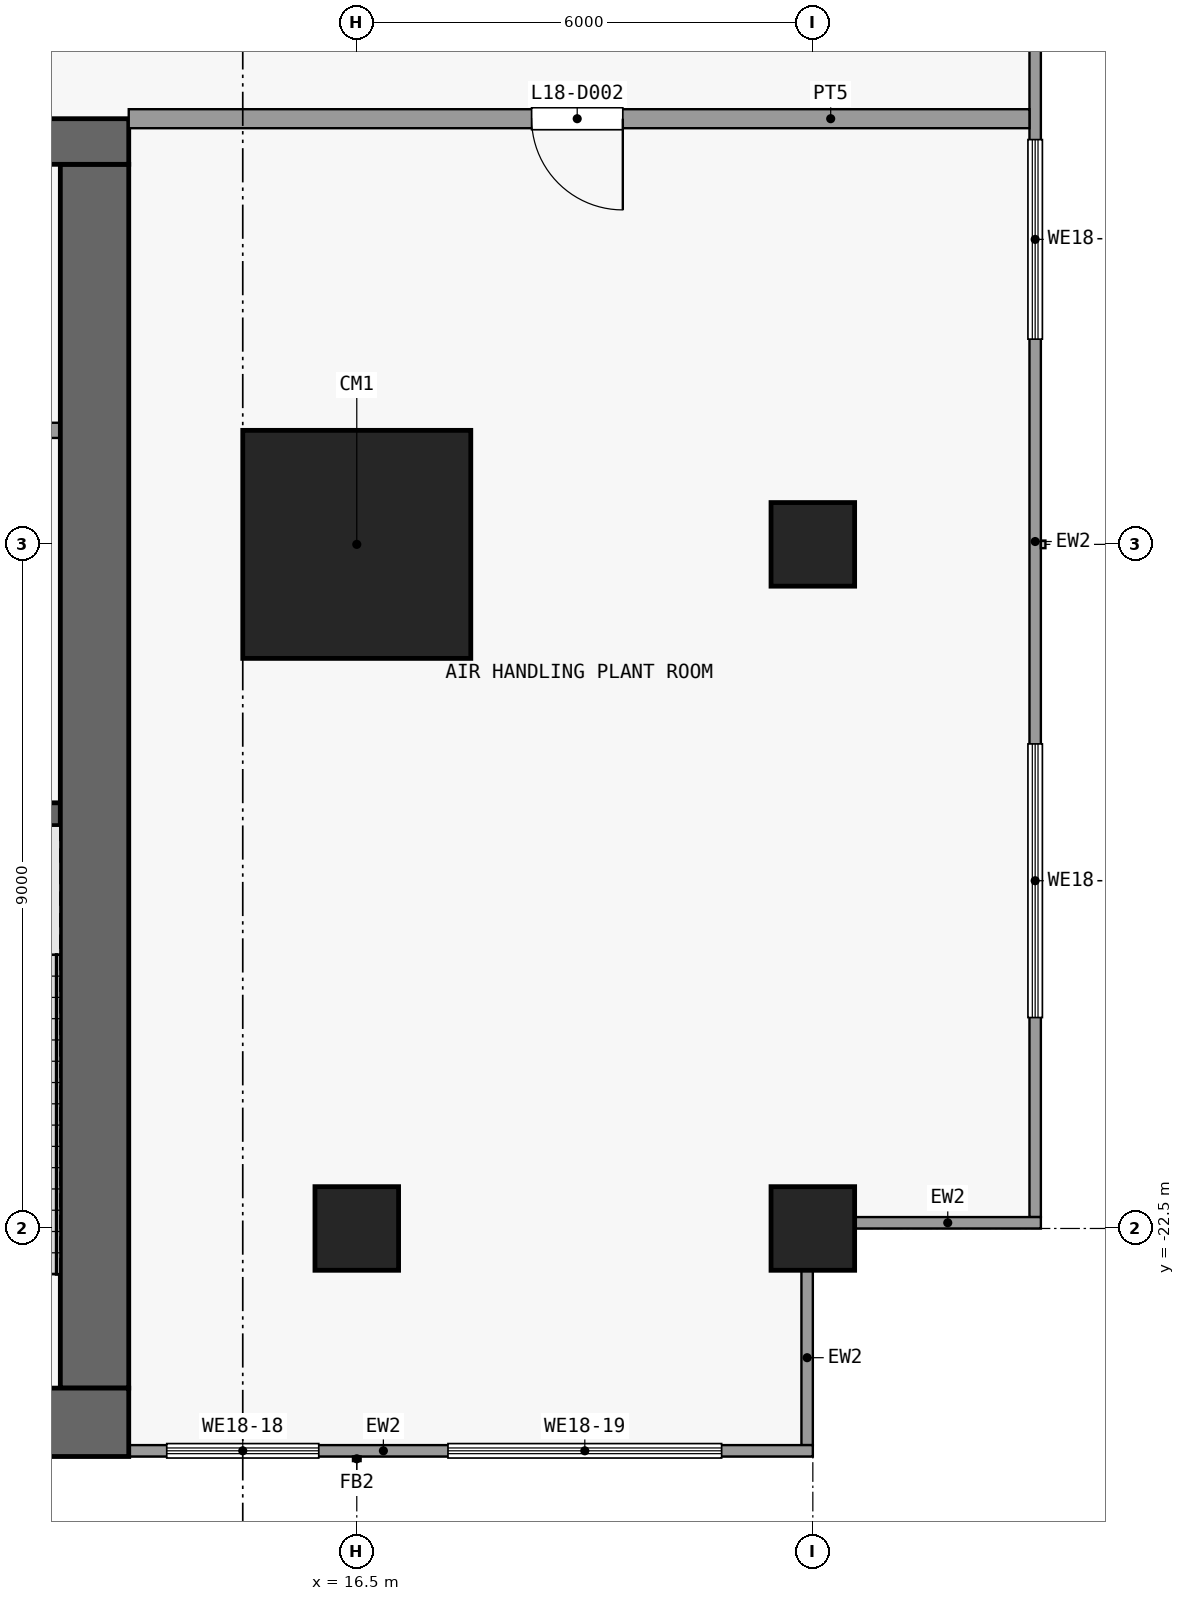
"""IFC4 building model, lengths in metres.
Left out: names, types, materials, properties, quantities, classifications, styles, units other than length and angle.
Written with IfcOpenShell. Run it as: python <this file> out.ifc"""

import sys

from ifc_helpers import new_model, si_unit, direction, frame, frame_2d, origin, origin_2d, place, context, subcontext, project, spatial, rectangle, extrude, element, fill, save


model = new_model("IFC4")
c1 = context("Model", 3, precision=1e-05, world=origin(), true_north=direction((0.0, 1.0)))
c2 = subcontext(c1, "Body", "Model", "MODEL_VIEW")
j1 = project(units=[si_unit("LENGTHUNIT", "METRE"), si_unit("PLANEANGLEUNIT", "RADIAN")], contexts=[c1])
p1 = place(None, origin())
s1 = spatial("IfcSite", under=j1, at=p1, CompositionType="ELEMENT")
p2 = place(p1, origin())
s2 = spatial("IfcBuilding", under=s1, at=p2, CompositionType="ELEMENT")
p3 = place(p2, frame((0.0, 0.0, 75.7)))
s3 = spatial("IfcBuildingStorey", under=s2, at=p3, CompositionType="ELEMENT", Elevation=75.7)
p4 = place(p3, frame((16.5, -22.5, 0.0), z_axis=(0.0, 0.0, 1.0), x_axis=(1.0, 0.0, 0.0)))
e1 = element("IfcColumn", 1, at=p4, inside=s3, PredefinedType="COLUMN", context=c2, shape_type="SweptSolid", body=[
    extrude(rectangle(XDim=1.1, YDim=1.1, at=origin_2d()), origin(), (0.0, 0.0, 1.0), 5.4),
])
p5 = place(p3, frame((16.5, -13.5, 0.0), z_axis=(0.0, 0.0, 1.0), x_axis=(1.0, 0.0, 0.0)))
e2 = element("IfcColumn", 2, at=p5, inside=s3, PredefinedType="COLUMN", context=c2, shape_type="SweptSolid", body=[
    extrude(rectangle(XDim=3.0, YDim=3.0, at=origin_2d()), origin(), (0.0, 0.0, 1.0), 5.4),
])
for number, where, z_axis, x_axis in (
    (3, (22.5, -22.5, 0.0), (0.0, 0.0, 1.0), (1.0, 0.0, 0.0)),
    (4, (22.5, -13.5, 0.0), (0.0, 0.0, 1.0), (1.0, 0.0, 0.0)),
):
    element("IfcColumn", number, at=place(p3, frame(where, z_axis=z_axis, x_axis=x_axis)), inside=s3, PredefinedType="COLUMN", context=c2, shape_type="SweptSolid", body=[
        extrude(rectangle(XDim=1.1, YDim=1.1, at=origin_2d()), origin(), (0.0, 0.0, 1.0), 5.4),
    ])
p6 = place(p3, frame((-13.5, -25.05, 0.0), z_axis=(0.0, 0.0, 1.0), x_axis=(1.0, 0.0, 0.0)))
e5 = element("IfcWall", 5, at=p6, inside=s3, PredefinedType="SHEAR", context=c2, shape_type="SweptSolid", body=[
    extrude(rectangle(XDim=27.0, YDim=0.9, at=frame_2d((13.5, 0.0))), origin(), (0.0, 0.0, 1.0), 5.0),
])
p7 = place(p3, frame((-13.5, -8.2, 0.0), z_axis=(0.0, 0.0, 1.0), x_axis=(1.0, 0.0, 0.0)))
e6 = element("IfcWall", 6, at=p7, inside=s3, PredefinedType="SHEAR", context=c2, shape_type="SweptSolid", body=[
    extrude(rectangle(XDim=27.0, YDim=0.6, at=frame_2d((13.5, 0.0))), origin(), (0.0, 0.0, 1.0), 5.0),
])
p8 = place(p7, frame((7.8, 0.0, 0.0)))
e7 = element("IfcOpeningElement", 7, at=p8, cuts=e6, PredefinedType="OPENING", context=c2, shape_type="SweptSolid", body=[
    extrude(rectangle(XDim=1.8, YDim=2.1, at=frame_2d((0.9, 1.05))), frame((0.0, 0.31, 0.0), z_axis=(0.0, -1.0, 0.0), x_axis=(1.0, 0.0, 0.0)), (0.0, 0.0, 1.0), 0.62),
])
p9 = place(p7, frame((17.4, 0.0, 0.0)))
e8 = element("IfcOpeningElement", 8, at=p9, cuts=e6, PredefinedType="OPENING", context=c2, shape_type="SweptSolid", body=[
    extrude(rectangle(XDim=1.8, YDim=2.1, at=frame_2d((0.9, 1.05))), frame((0.0, 0.31, 0.0), z_axis=(0.0, -1.0, 0.0), x_axis=(1.0, 0.0, 0.0)), (0.0, 0.0, 1.0), 0.62),
])
p10 = place(p7, frame((2.725, 0.0, 0.0)))
e9 = element("IfcOpeningElement", 9, at=p10, cuts=e6, PredefinedType="OPENING", context=c2, shape_type="SweptSolid", body=[
    extrude(rectangle(XDim=0.9, YDim=2.1, at=frame_2d((0.45, 1.05))), frame((0.0, 0.31, 0.0), z_axis=(0.0, -1.0, 0.0), x_axis=(1.0, 0.0, 0.0)), (0.0, 0.0, 1.0), 0.62),
])
p11 = place(p7, frame((23.375, 0.0, 0.0)))
e10 = element("IfcOpeningElement", 10, at=p11, cuts=e6, PredefinedType="OPENING", context=c2, shape_type="SweptSolid", body=[
    extrude(rectangle(XDim=0.9, YDim=2.1, at=frame_2d((0.45, 1.05))), frame((0.0, 0.31, 0.0), z_axis=(0.0, -1.0, 0.0), x_axis=(1.0, 0.0, 0.0)), (0.0, 0.0, 1.0), 0.62),
])
p12 = place(p3, frame((13.05, -24.6, 0.0), z_axis=(0.0, 0.0, 1.0), x_axis=(0.0, 1.0, 0.0)))
e11 = element("IfcWall", 11, at=p12, inside=s3, PredefinedType="SHEAR", context=c2, shape_type="SweptSolid", body=[
    extrude(rectangle(XDim=16.1, YDim=0.9, at=frame_2d((8.05, 0.0))), origin(), (0.0, 0.0, 1.0), 5.0),
])
p13 = place(p3, frame((9.5, -17.05, 0.0), z_axis=(0.0, 0.0, 1.0), x_axis=(1.0, 0.0, 0.0)))
e12 = element("IfcWall", 12, at=p13, inside=s3, PredefinedType="SHEAR", context=c2, shape_type="SweptSolid", body=[
    extrude(rectangle(XDim=3.1, YDim=0.3, at=frame_2d((1.55, 0.0))), origin(), (0.0, 0.0, 1.0), 5.0),
])
p14 = place(p3, frame((11.15, -12.0, 0.0), z_axis=(0.0, 0.0, 1.0), x_axis=(1.0, 0.0, 0.0)))
e13 = element("IfcWall", 13, at=p14, inside=s3, PredefinedType="PARTITIONING", context=c2, shape_type="SweptSolid", body=[
    extrude(rectangle(XDim=1.45, YDim=0.2, at=frame_2d((0.725, 0.0))), origin(), (0.0, 0.0, 1.0), 5.0),
])
p15 = place(p3, frame((25.425, 25.35, 0.0), z_axis=(0.0, 0.0, 1.0), x_axis=(0.0, -1.0, 0.0)))
e14 = element("IfcWall", 14, at=p15, inside=s3, PredefinedType="SOLIDWALL", context=c2, shape_type="SweptSolid", body=[
    extrude(rectangle(XDim=47.7, YDim=0.15, at=frame_2d((23.85, 0.0))), origin(), (0.0, 0.0, 1.0), 5.0),
])
p16 = place(p15, frame((41.475, 0.0, 1.2)))
e15 = element("IfcOpeningElement", 15, at=p16, cuts=e14, PredefinedType="OPENING", context=c2, shape_type="SweptSolid", body=[
    extrude(rectangle(XDim=3.6, YDim=3.0, at=frame_2d((1.8, 1.5))), frame((0.0, 0.085, 0.0), z_axis=(0.0, -1.0, 0.0), x_axis=(1.0, 0.0, 0.0)), (0.0, 0.0, 1.0), 0.17),
])
p17 = place(p15, frame((33.525, 0.0, 1.2)))
e16 = element("IfcOpeningElement", 16, at=p17, cuts=e14, PredefinedType="OPENING", context=c2, shape_type="SweptSolid", body=[
    extrude(rectangle(XDim=2.625, YDim=3.0, at=frame_2d((1.312, 1.5))), frame((0.0, 0.085, 0.0), z_axis=(0.0, -1.0, 0.0), x_axis=(1.0, 0.0, 0.0)), (0.0, 0.0, 1.0), 0.17),
])
p18 = place(p15, frame((25.05, 0.0, 1.2)))
e17 = element("IfcOpeningElement", 17, at=p18, cuts=e14, PredefinedType="OPENING", context=c2, shape_type="SweptSolid", body=[
    extrude(rectangle(XDim=3.6, YDim=3.0, at=frame_2d((1.8, 1.5))), frame((0.0, 0.085, 0.0), z_axis=(0.0, -1.0, 0.0), x_axis=(1.0, 0.0, 0.0)), (0.0, 0.0, 1.0), 0.17),
])
p19 = place(p15, frame((19.05, 0.0, 1.2)))
e18 = element("IfcOpeningElement", 18, at=p19, cuts=e14, PredefinedType="OPENING", context=c2, shape_type="SweptSolid", body=[
    extrude(rectangle(XDim=3.6, YDim=3.0, at=frame_2d((1.8, 1.5))), frame((0.0, 0.085, 0.0), z_axis=(0.0, -1.0, 0.0), x_axis=(1.0, 0.0, 0.0)), (0.0, 0.0, 1.0), 0.17),
])
p20 = place(p15, frame((13.05, 0.0, 1.2)))
e19 = element("IfcOpeningElement", 19, at=p20, cuts=e14, PredefinedType="OPENING", context=c2, shape_type="SweptSolid", body=[
    extrude(rectangle(XDim=3.6, YDim=3.0, at=frame_2d((1.8, 1.5))), frame((0.0, 0.085, 0.0), z_axis=(0.0, -1.0, 0.0), x_axis=(1.0, 0.0, 0.0)), (0.0, 0.0, 1.0), 0.17),
])
p21 = place(p15, frame((9.125, 0.0, 1.2)))
e20 = element("IfcOpeningElement", 20, at=p21, cuts=e14, PredefinedType="OPENING", context=c2, shape_type="SweptSolid", body=[
    extrude(rectangle(XDim=1.525, YDim=3.0, at=frame_2d((0.762, 1.5))), frame((0.0, 0.085, 0.0), z_axis=(0.0, -1.0, 0.0), x_axis=(1.0, 0.0, 0.0)), (0.0, 0.0, 1.0), 0.17),
])
p22 = place(p15, frame((7.05, 0.0, 1.2)))
e21 = element("IfcOpeningElement", 21, at=p22, cuts=e14, PredefinedType="OPENING", context=c2, shape_type="SweptSolid", body=[
    extrude(rectangle(XDim=1.525, YDim=3.0, at=frame_2d((0.762, 1.5))), frame((0.0, 0.085, 0.0), z_axis=(0.0, -1.0, 0.0), x_axis=(1.0, 0.0, 0.0)), (0.0, 0.0, 1.0), 0.17),
])
p23 = place(p15, frame((1.125, 0.0, 1.2)))
e22 = element("IfcOpeningElement", 22, at=p23, cuts=e14, PredefinedType="OPENING", context=c2, shape_type="SweptSolid", body=[
    extrude(rectangle(XDim=3.6, YDim=3.0, at=frame_2d((1.8, 1.5))), frame((0.0, 0.085, 0.0), z_axis=(0.0, -1.0, 0.0), x_axis=(1.0, 0.0, 0.0)), (0.0, 0.0, 1.0), 0.17),
])
p24 = place(p3, frame((22.5, -25.425, 0.0), z_axis=(0.0, 0.0, 1.0), x_axis=(-1.0, 0.0, 0.0)))
e23 = element("IfcWall", 23, at=p24, inside=s3, PredefinedType="SOLIDWALL", context=c2, shape_type="SweptSolid", body=[
    extrude(rectangle(XDim=9.0, YDim=0.15, at=frame_2d((4.5, 0.0))), origin(), (0.0, 0.0, 1.0), 5.0),
])
p25 = place(p24, frame((6.5, 0.0, 1.2)))
e24 = element("IfcOpeningElement", 24, at=p25, cuts=e23, PredefinedType="OPENING", context=c2, shape_type="SweptSolid", body=[
    extrude(rectangle(XDim=2.0, YDim=3.0, at=frame_2d((1.0, 1.5))), frame((0.0, 0.085, 0.0), z_axis=(0.0, -1.0, 0.0), x_axis=(1.0, 0.0, 0.0)), (0.0, 0.0, 1.0), 0.17),
])
p26 = place(p24, frame((1.2, 0.0, 1.2)))
e25 = element("IfcOpeningElement", 25, at=p26, cuts=e23, PredefinedType="OPENING", context=c2, shape_type="SweptSolid", body=[
    extrude(rectangle(XDim=3.6, YDim=3.0, at=frame_2d((1.8, 1.5))), frame((0.0, 0.085, 0.0), z_axis=(0.0, -1.0, 0.0), x_axis=(1.0, 0.0, 0.0)), (0.0, 0.0, 1.0), 0.17),
])
p27 = place(p3, frame((22.425, -23.05, 0.0), z_axis=(0.0, 0.0, 1.0), x_axis=(0.0, -1.0, 0.0)))
e26 = element("IfcWall", 26, at=p27, inside=s3, PredefinedType="SOLIDWALL", context=c2, shape_type="SweptSolid", body=[
    extrude(rectangle(XDim=2.3, YDim=0.15, at=frame_2d((1.15, 0.0))), origin(), (0.0, 0.0, 1.0), 5.0),
])
p28 = place(p3, frame((25.5, -22.425, 0.0), z_axis=(0.0, 0.0, 1.0), x_axis=(-1.0, 0.0, 0.0)))
e27 = element("IfcWall", 27, at=p28, inside=s3, PredefinedType="SOLIDWALL", context=c2, shape_type="SweptSolid", body=[
    extrude(rectangle(XDim=2.45, YDim=0.15, at=frame_2d((1.225, 0.0))), origin(), (0.0, 0.0, 1.0), 5.0),
])
p29 = place(p3, frame((13.5, -7.9, 0.0), z_axis=(0.0, 0.0, 1.0), x_axis=(1.0, 0.0, 0.0)))
e28 = element("IfcWall", 28, at=p29, inside=s3, PredefinedType="PARTITIONING", context=c2, shape_type="SweptSolid", body=[
    extrude(rectangle(XDim=11.85, YDim=0.25, at=frame_2d((5.925, 0.0))), origin(), (0.0, 0.0, 1.0), 5.0),
])
p30 = place(p29, frame((5.3, 0.0, 0.0)))
e29 = element("IfcOpeningElement", 29, at=p30, cuts=e28, PredefinedType="OPENING", context=c2, shape_type="SweptSolid", body=[
    extrude(rectangle(XDim=1.2, YDim=2.1, at=frame_2d((0.6, 1.05))), frame((0.0, 0.135, 0.0), z_axis=(0.0, -1.0, 0.0), x_axis=(1.0, 0.0, 0.0)), (0.0, 0.0, 1.0), 0.27),
])
p31 = place(p16, origin())
e30 = element("IfcWindow", 30, at=p31, inside=s3, PartitioningType="SINGLE_PANEL", PredefinedType="WINDOW", context=c2, shape_type="SweptSolid", body=[
    extrude(rectangle(XDim=3.6, YDim=3.0, at=frame_2d((1.8, 1.5))), frame((0.0, 0.03, 0.0), z_axis=(0.0, -1.0, 0.0), x_axis=(1.0, 0.0, 0.0)), (0.0, 0.0, 1.0), 0.06),
])
fill(e15, e30)
p32 = place(p17, origin())
e31 = element("IfcWindow", 31, at=p32, inside=s3, PartitioningType="SINGLE_PANEL", PredefinedType="WINDOW", context=c2, shape_type="SweptSolid", body=[
    extrude(rectangle(XDim=2.625, YDim=3.0, at=frame_2d((1.312, 1.5))), frame((0.0, 0.03, 0.0), z_axis=(0.0, -1.0, 0.0), x_axis=(1.0, 0.0, 0.0)), (0.0, 0.0, 1.0), 0.06),
])
fill(e16, e31)
p33 = place(p25, origin())
e32 = element("IfcWindow", 32, at=p33, inside=s3, PartitioningType="SINGLE_PANEL", PredefinedType="WINDOW", context=c2, shape_type="SweptSolid", body=[
    extrude(rectangle(XDim=2.0, YDim=3.0, at=frame_2d((1.0, 1.5))), frame((0.0, 0.03, 0.0), z_axis=(0.0, -1.0, 0.0), x_axis=(1.0, 0.0, 0.0)), (0.0, 0.0, 1.0), 0.06),
])
fill(e24, e32)
p34 = place(p26, origin())
e33 = element("IfcWindow", 33, at=p34, inside=s3, PartitioningType="SINGLE_PANEL", PredefinedType="WINDOW", context=c2, shape_type="SweptSolid", body=[
    extrude(rectangle(XDim=3.6, YDim=3.0, at=frame_2d((1.8, 1.5))), frame((0.0, 0.03, 0.0), z_axis=(0.0, -1.0, 0.0), x_axis=(1.0, 0.0, 0.0)), (0.0, 0.0, 1.0), 0.06),
])
fill(e25, e33)
p35 = place(p30, origin())
e34 = element("IfcDoor", 34, at=p35, inside=s3, OperationType="SINGLE_SWING_RIGHT", PredefinedType="DOOR", context=c2, shape_type="SweptSolid", body=[
    extrude(rectangle(XDim=1.2, YDim=2.1, at=frame_2d((0.6, 1.05))), frame((0.0, 0.025, 0.0), z_axis=(0.0, -1.0, 0.0), x_axis=(1.0, 0.0, 0.0)), (0.0, 0.0, 1.0), 0.05),
])
fill(e29, e34)
save(model, sys.argv[1])
